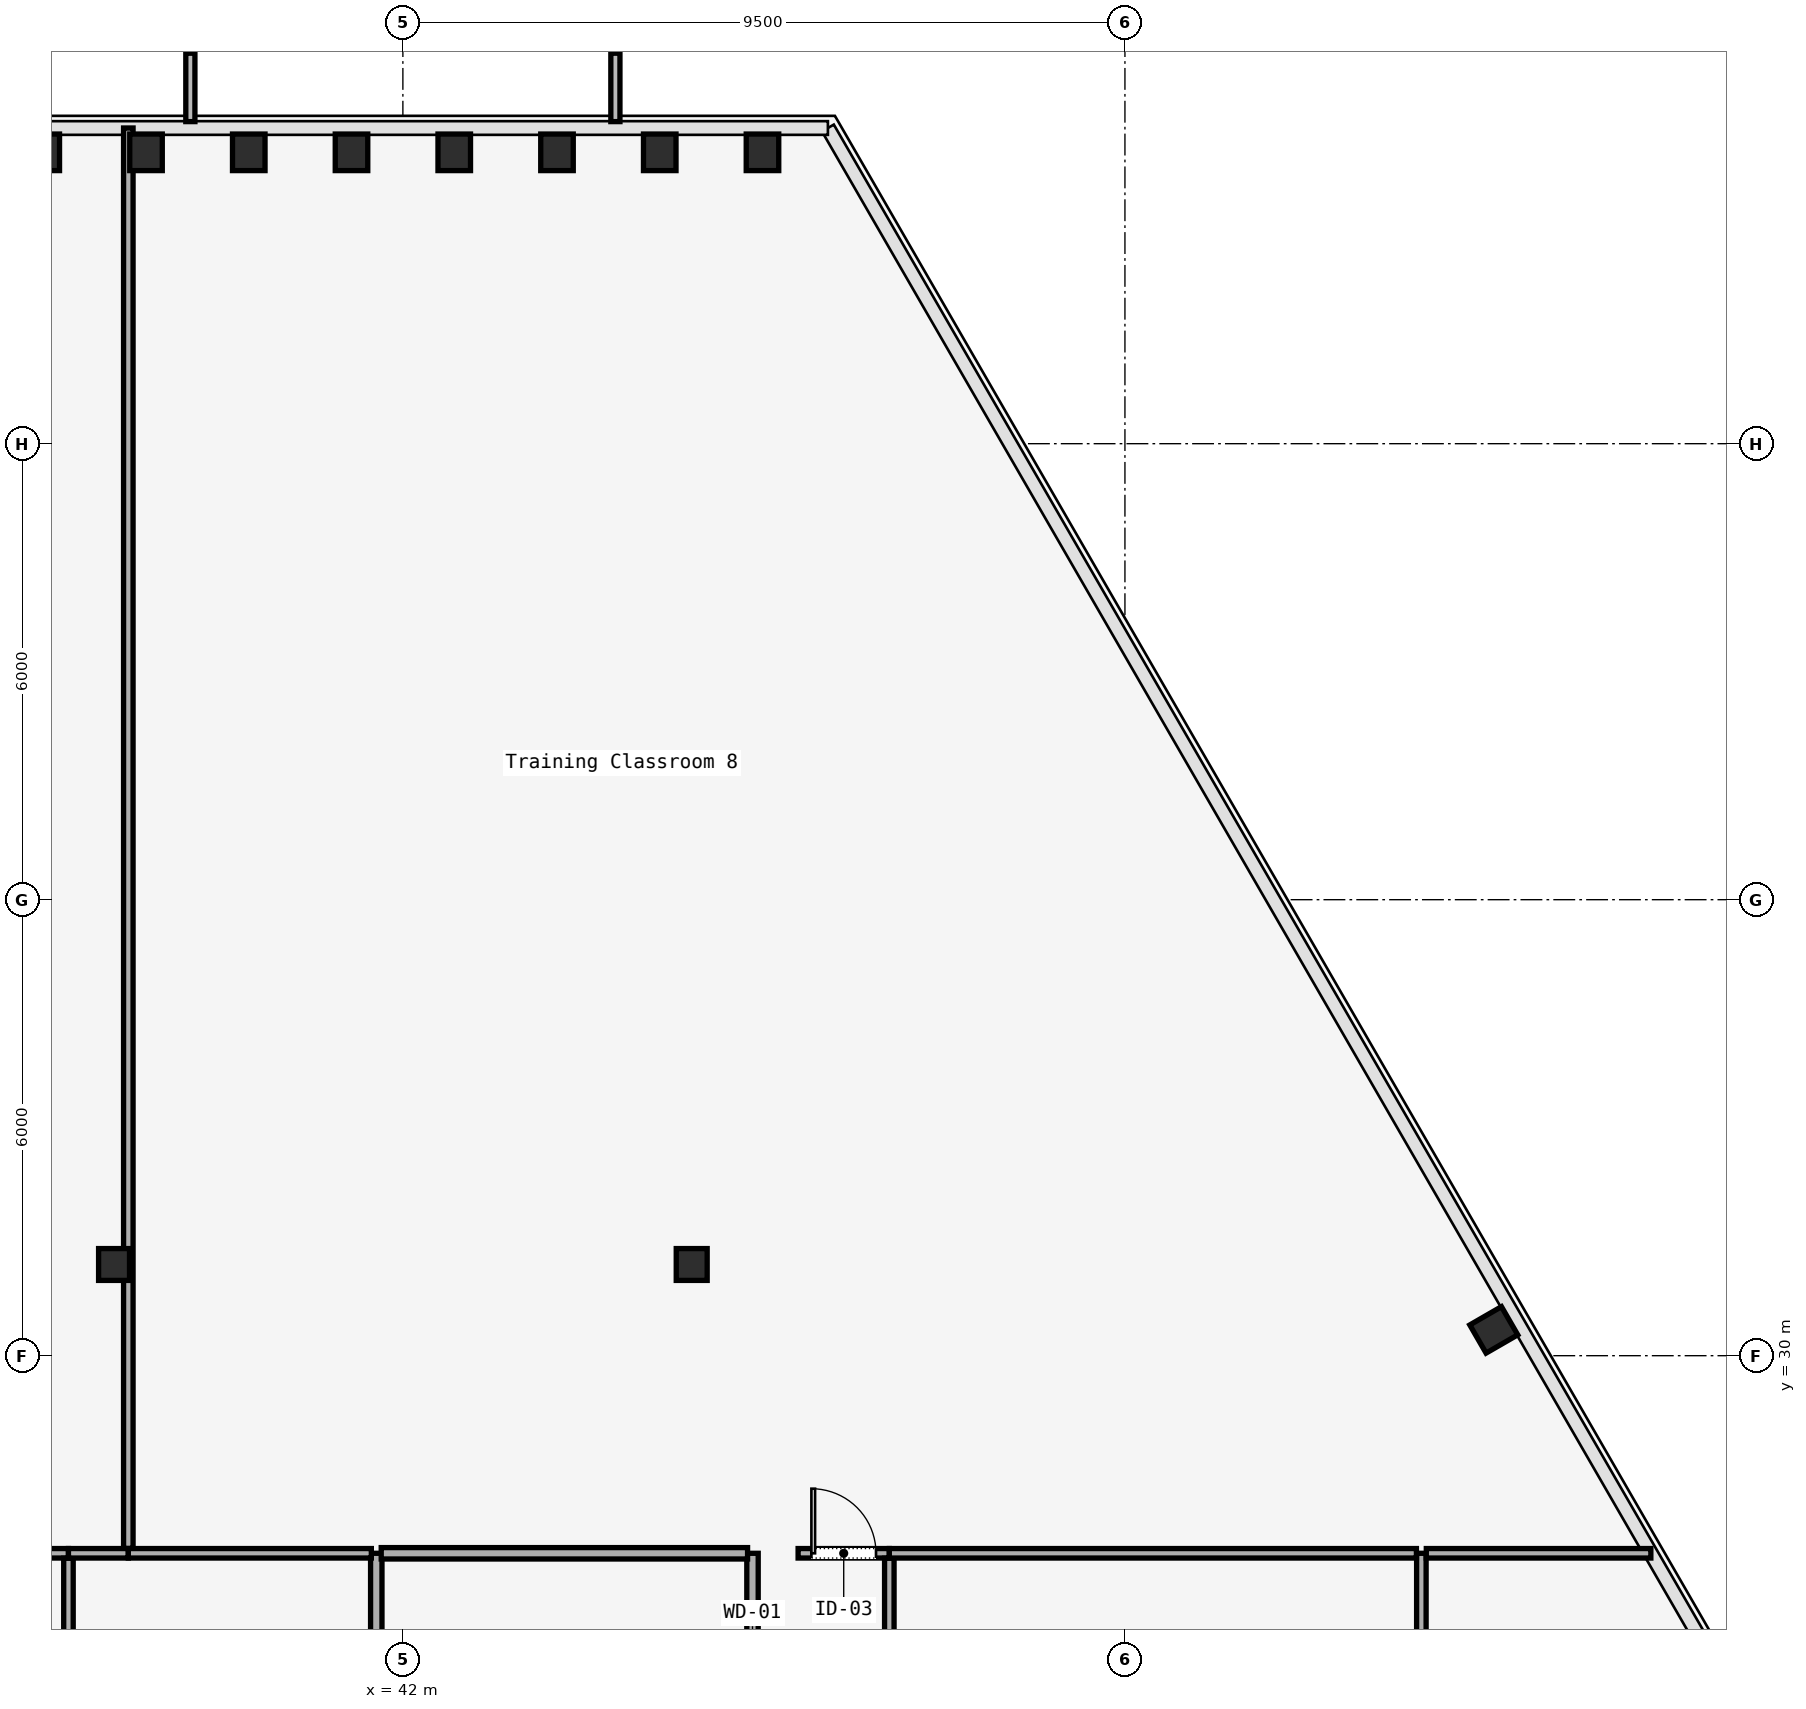
"""IFC4 building model, lengths in metres.
Left out: names, types, materials, properties, quantities, classifications, styles, units other than length and angle.
Written with IfcOpenShell. Run it as: python <this file> out.ifc"""

import sys

from ifc_helpers import new_model, si_unit, direction, frame, frame_2d, origin, origin_2d, place, context, subcontext, project, spatial, rectangle, i_section, extrude, element, fill, save


model = new_model("IFC4")
c1 = context("Model", 3, precision=1e-05, world=origin(), true_north=direction((0.0, 1.0)))
c2 = subcontext(c1, "Body", "Model", "MODEL_VIEW")
j1 = project(units=[si_unit("LENGTHUNIT", "METRE"), si_unit("PLANEANGLEUNIT", "RADIAN")], contexts=[c1])
p1 = place(None, origin())
s1 = spatial("IfcSite", under=j1, at=p1, CompositionType="ELEMENT")
p2 = place(p1, origin())
s2 = spatial("IfcBuilding", under=s1, at=p2, CompositionType="ELEMENT")
p3 = place(p2, frame((0.0, 0.0, 153.6)))
s3 = spatial("IfcBuildingStorey", under=s2, at=p3, CompositionType="ELEMENT", Elevation=153.6)
for number, where, z_axis, x_axis in (
    (1, (38.2, 31.2, 0.0), (0.0, 0.0, 1.0), (1.0, 0.0, 0.0)),
    (2, (45.8, 31.2, 0.0), (0.0, 0.0, 1.0), (1.0, 0.0, 0.0)),
):
    element("IfcColumn", number, at=place(p3, frame(where, z_axis=z_axis, x_axis=x_axis)), inside=s3, PredefinedType="COLUMN", context=c2, shape_type="SweptSolid", body=[
        extrude(i_section(OverallWidth=0.407, OverallDepth=0.419, WebThickness=0.031, FlangeThickness=0.049, FilletRadius=0.015, at=origin_2d()), origin(), (0.0, 0.0, 1.0), 3.58),
    ])
for number, where, z_axis, x_axis in (
    (3, (56.353, 30.34, 0.0), (0.0, 0.0, 1.0), (-0.5, 0.866, 0.0)),
    (4, (46.731, 45.834, 0.0), (0.0, 0.0, 1.0), (1.0, 0.0, 0.0)),
    (5, (45.379, 45.834, 0.0), (0.0, 0.0, 1.0), (1.0, 0.0, 0.0)),
    (6, (44.028, 45.834, 0.0), (0.0, 0.0, 1.0), (1.0, 0.0, 0.0)),
    (7, (42.676, 45.834, 0.0), (0.0, 0.0, 1.0), (1.0, 0.0, 0.0)),
    (8, (41.324, 45.834, 0.0), (0.0, 0.0, 1.0), (1.0, 0.0, 0.0)),
    (9, (39.972, 45.834, 0.0), (0.0, 0.0, 1.0), (1.0, 0.0, 0.0)),
    (10, (38.621, 45.834, 0.0), (0.0, 0.0, 1.0), (1.0, 0.0, 0.0)),
    (11, (37.269, 45.834, 0.0), (0.0, 0.0, 1.0), (1.0, 0.0, 0.0)),
):
    element("IfcColumn", number, at=place(p3, frame(where, z_axis=z_axis, x_axis=x_axis)), inside=s3, PredefinedType="COLUMN", context=c2, shape_type="SweptSolid", body=[
        extrude(i_section(OverallWidth=0.428, OverallDepth=0.481, WebThickness=0.051, FlangeThickness=0.065, FilletRadius=0.015, at=origin_2d()), origin(), (0.0, 0.0, 1.0), 3.58),
    ])
p4 = place(p3, frame((35.865, 27.4, 0.0), z_axis=(0.0, 0.0, 1.0), x_axis=(1.0, 0.0, 0.0)))
e12 = element("IfcWall", 12, at=p4, inside=s3, PredefinedType="PARTITIONING", context=c2, shape_type="SweptSolid", body=[
    extrude(rectangle(XDim=1.735, YDim=0.125, at=frame_2d((0.868, 0.0))), origin(), (0.0, 0.0, 1.0), 3.01),
])
p5 = place(p4, frame((0.393, 0.0, 0.0)))
e13 = element("IfcOpeningElement", 13, at=p5, cuts=e12, PredefinedType="OPENING", context=c2, shape_type="SweptSolid", body=[
    extrude(rectangle(XDim=0.95, YDim=2.2, at=frame_2d((0.475, 1.1))), frame((0.0, 0.062, 0.0), z_axis=(0.0, -1.0, 0.0), x_axis=(1.0, 0.0, 0.0)), (0.0, 0.0, 1.0), 0.125),
])
p6 = place(p3, frame((37.6, 27.335, 0.0), z_axis=(0.0, 0.0, 1.0), x_axis=(0.0, -1.0, 0.0)))
e14 = element("IfcWall", 14, at=p6, inside=s3, PredefinedType="PARTITIONING", context=c2, shape_type="SweptSolid", body=[
    extrude(rectangle(XDim=3.424, YDim=0.125, at=frame_2d((1.712, 0.0))), origin(), (0.0, 0.0, 1.0), 3.01),
])
p7 = place(p6, frame((1.237, 0.0, 0.0)))
e15 = element("IfcOpeningElement", 15, at=p7, cuts=e14, PredefinedType="OPENING", context=c2, shape_type="SweptSolid", body=[
    extrude(rectangle(XDim=0.95, YDim=2.2, at=frame_2d((0.475, 1.1))), frame((0.0, 0.062, 0.0), z_axis=(0.0, -1.0, 0.0), x_axis=(1.0, 0.0, 0.0)), (0.0, 0.0, 1.0), 0.125),
])
p8 = place(p3, frame((46.6, 23.72, 0.0), z_axis=(0.0, 0.0, 1.0), x_axis=(0.0, 1.0, 0.0)))
e16 = element("IfcWall", 16, at=p8, inside=s3, PredefinedType="PARTITIONING", context=c2, shape_type="SweptSolid", body=[
    extrude(rectangle(XDim=3.679, YDim=0.15, at=frame_2d((1.84, 0.0))), origin(), (0.0, 0.0, 1.0), 3.01),
])
p9 = place(p8, frame((1.39, 0.0, 0.0)))
e17 = element("IfcOpeningElement", 17, at=p9, cuts=e16, PredefinedType="OPENING", context=c2, shape_type="SweptSolid", body=[
    extrude(rectangle(XDim=0.9, YDim=2.15, at=frame_2d((0.45, 1.075))), frame((0.0, 0.075, 0.0), z_axis=(0.0, -1.0, 0.0), x_axis=(1.0, 0.0, 0.0)), (0.0, 0.0, 1.0), 0.15),
])
p10 = place(p3, frame((47.2, 27.4, 0.0), z_axis=(0.0, 0.0, 1.0), x_axis=(1.0, 0.0, 0.0)))
e18 = element("IfcWall", 18, at=p10, inside=s3, PredefinedType="PARTITIONING", context=c2, shape_type="SweptSolid", body=[
    extrude(rectangle(XDim=1.2, YDim=0.125, at=frame_2d((0.6, 0.0))), origin(), (0.0, 0.0, 1.0), 3.01),
])
p11 = place(p10, frame((0.175, 0.0, 0.0)))
e19 = element("IfcOpeningElement", 19, at=p11, cuts=e18, PredefinedType="OPENING", context=c2, shape_type="SweptSolid", body=[
    extrude(rectangle(XDim=0.85, YDim=2.15, at=frame_2d((0.425, 1.075))), frame((0.0, 0.062, 0.0), z_axis=(0.0, -1.0, 0.0), x_axis=(1.0, 0.0, 0.0)), (0.0, 0.0, 1.0), 0.125),
])
p12 = place(p3, frame((48.4, 27.335, 0.0), z_axis=(0.0, 0.0, 1.0), x_axis=(0.0, -1.0, 0.0)))
e20 = element("IfcWall", 20, at=p12, inside=s3, PredefinedType="PARTITIONING", context=c2, shape_type="SweptSolid", body=[
    extrude(rectangle(XDim=3.615, YDim=0.125, at=frame_2d((1.807, 0.0))), origin(), (0.0, 0.0, 1.0), 3.01),
])
p13 = place(p12, frame((1.107, 0.0, 0.0)))
e21 = element("IfcOpeningElement", 21, at=p13, cuts=e20, PredefinedType="OPENING", context=c2, shape_type="SweptSolid", body=[
    extrude(rectangle(XDim=1.4, YDim=2.2, at=frame_2d((0.7, 1.1))), frame((0.0, 0.062, 0.0), z_axis=(0.0, -1.0, 0.0), x_axis=(1.0, 0.0, 0.0)), (0.0, 0.0, 1.0), 0.125),
])
p14 = place(p3, frame((55.4, 23.72, 0.0), z_axis=(0.0, 0.0, 1.0), x_axis=(0.0, 1.0, 0.0)))
e22 = element("IfcWall", 22, at=p14, inside=s3, PredefinedType="PARTITIONING", context=c2, shape_type="SweptSolid", body=[
    extrude(rectangle(XDim=3.679, YDim=0.125, at=frame_2d((1.84, 0.0))), origin(), (0.0, 0.0, 1.0), 3.01),
])
p15 = place(p3, frame((55.465, 27.4, 0.0), z_axis=(0.0, 0.0, 1.0), x_axis=(1.0, 0.0, 0.0)))
e23 = element("IfcWall", 23, at=p15, inside=s3, PredefinedType="PARTITIONING", context=c2, shape_type="SweptSolid", body=[
    extrude(rectangle(XDim=2.954, YDim=0.125, at=frame_2d((1.477, 0.0))), origin(), (0.0, 0.0, 1.0), 3.01),
])
p16 = place(p3, frame((41.65, 23.976, 0.0), z_axis=(0.0, 0.0, 1.0), x_axis=(0.0, 1.0, 0.0)))
e24 = element("IfcWall", 24, at=p16, inside=s3, PredefinedType="PARTITIONING", context=c2, shape_type="SweptSolid", body=[
    extrude(rectangle(XDim=3.424, YDim=0.15, at=frame_2d((1.712, 0.0))), origin(), (0.0, 0.0, 1.0), 3.01),
])
p17 = place(p3, frame((41.715, 27.4, 0.0), z_axis=(0.0, 0.0, 1.0), x_axis=(1.0, 0.0, 0.0)))
e25 = element("IfcWall", 25, at=p17, inside=s3, PredefinedType="PARTITIONING", context=c2, shape_type="SweptSolid", body=[
    extrude(rectangle(XDim=4.82, YDim=0.15, at=frame_2d((2.41, 0.0))), origin(), (0.0, 0.0, 1.0), 3.01),
])
p18 = place(p3, frame((48.4, 27.4, 0.0), z_axis=(0.0, 0.0, 1.0), x_axis=(1.0, 0.0, 0.0)))
e26 = element("IfcWall", 26, at=p18, inside=s3, PredefinedType="PARTITIONING", context=c2, shape_type="SweptSolid", body=[
    extrude(rectangle(XDim=6.935, YDim=0.125, at=frame_2d((3.468, 0.0))), origin(), (0.0, 0.0, 1.0), 3.01),
])
p19 = place(p3, frame((37.6, 27.4, 0.0), z_axis=(0.0, 0.0, 1.0), x_axis=(1.0, 0.0, 0.0)))
e27 = element("IfcWall", 27, at=p19, inside=s3, PredefinedType="PARTITIONING", context=c2, shape_type="SweptSolid", body=[
    extrude(rectangle(XDim=0.788, YDim=0.125, at=frame_2d((0.394, 0.0))), origin(), (0.0, 0.0, 1.0), 3.01),
])
p20 = place(p3, frame((38.388, 27.4, 0.0), z_axis=(0.0, 0.0, 1.0), x_axis=(1.0, 0.0, 0.0)))
e28 = element("IfcWall", 28, at=p20, inside=s3, PredefinedType="PARTITIONING", context=c2, shape_type="SweptSolid", body=[
    extrude(rectangle(XDim=3.197, YDim=0.125, at=frame_2d((1.599, 0.0))), origin(), (0.0, 0.0, 1.0), 3.01),
])
p21 = place(p3, frame((38.388, 46.154, 0.0), z_axis=(0.0, 0.0, 1.0), x_axis=(0.0, -1.0, 0.0)))
e29 = element("IfcWall", 29, at=p21, inside=s3, PredefinedType="PARTITIONING", context=c2, shape_type="SweptSolid", body=[
    extrude(rectangle(XDim=18.689, YDim=0.125, at=frame_2d((9.344, 0.0))), origin(), (0.0, 0.0, 1.0), 3.01),
])
p22 = place(p11, origin())
e30 = element("IfcDoor", 30, at=p22, inside=s3, OperationType="SINGLE_SWING_LEFT", PredefinedType="DOOR", context=c2, shape_type="SweptSolid", body=[
    extrude(rectangle(XDim=0.85, YDim=2.15, at=frame_2d((0.425, 1.075))), frame((0.0, 0.025, 0.0), z_axis=(0.0, -1.0, 0.0), x_axis=(1.0, 0.0, 0.0)), (0.0, 0.0, 1.0), 0.05),
])
fill(e19, e30)
save(model, sys.argv[1])
